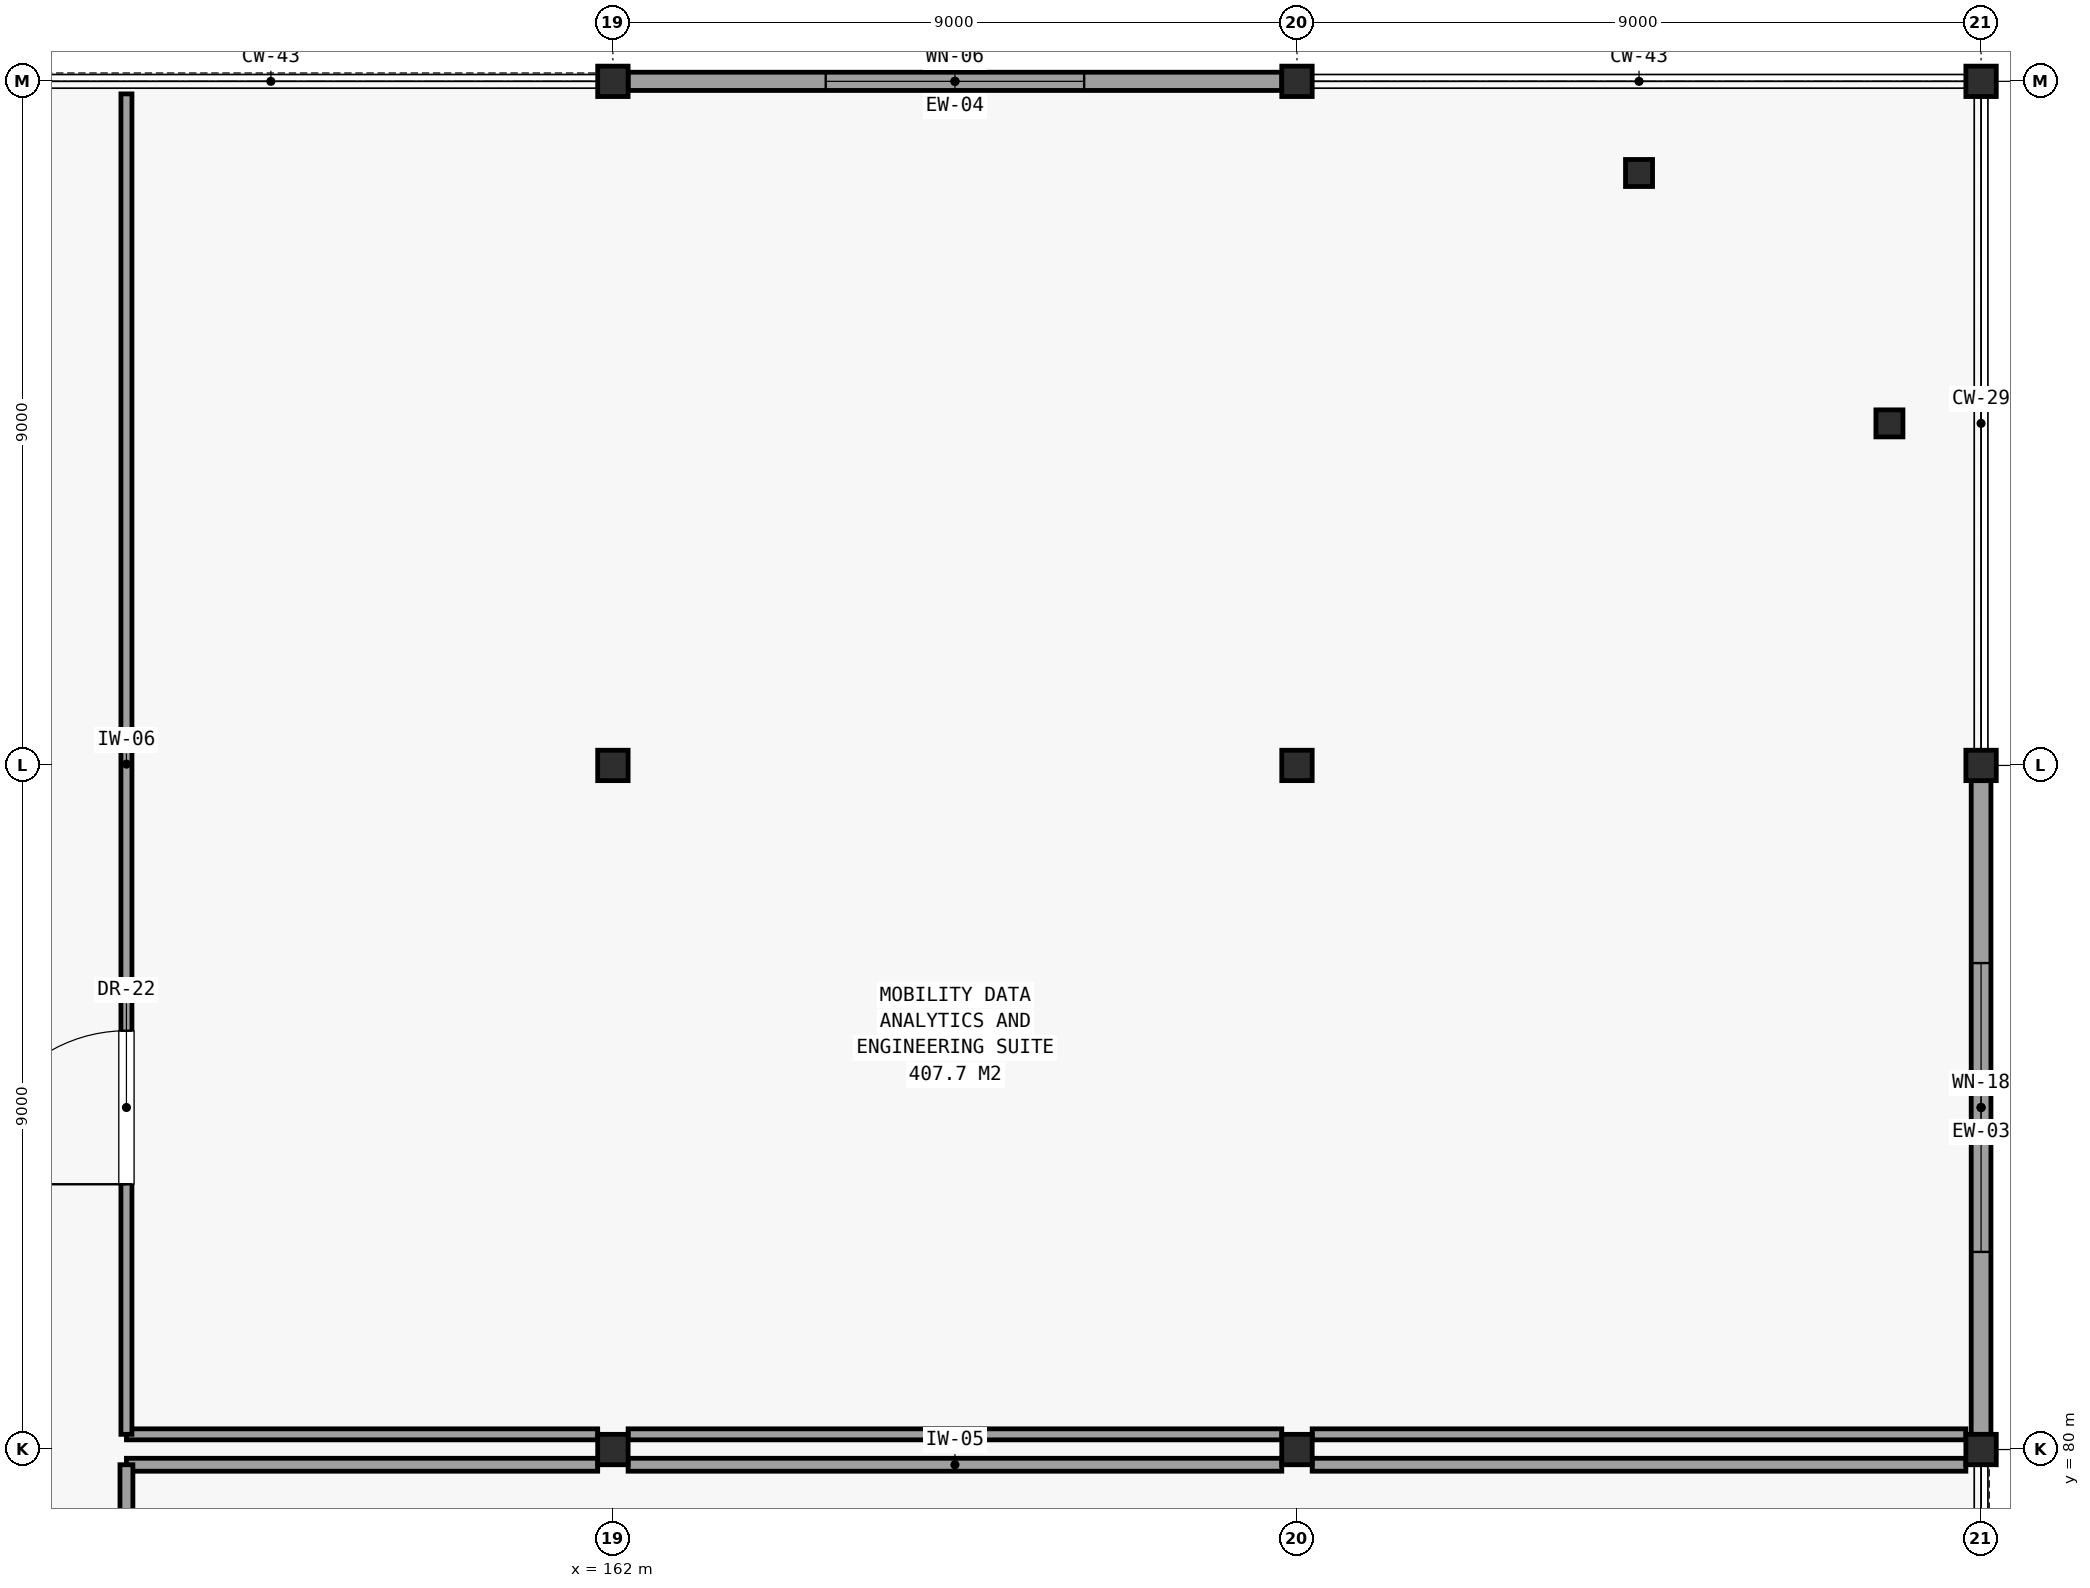
"""IFC4 building model, lengths in metres.
Left out: names, types, materials, properties, quantities, classifications, styles, units other than length and angle.
Written with IfcOpenShell. Run it as: python <this file> out.ifc"""

import sys

from ifc_helpers import new_model, si_unit, direction, frame, frame_2d, origin, origin_2d, place, context, subcontext, project, spatial, rectangle, hollow_rectangle, hollow_circle, extrude, element, fill, save


model = new_model("IFC4")
c1 = context("Model", 3, precision=1e-05, world=origin(), true_north=direction((0.0, 1.0)))
c2 = subcontext(c1, "Body", "Model", "MODEL_VIEW")
j1 = project(units=[si_unit("LENGTHUNIT", "METRE"), si_unit("PLANEANGLEUNIT", "RADIAN")], contexts=[c1])
p1 = place(None, origin())
s1 = spatial("IfcSite", under=j1, at=p1, CompositionType="ELEMENT")
p2 = place(p1, origin())
s2 = spatial("IfcBuilding", under=s1, at=p2, CompositionType="ELEMENT")
p3 = place(p2, frame((0.0, 0.0, 13.5)))
s3 = spatial("IfcBuildingStorey", under=s2, at=p3, CompositionType="ELEMENT", Elevation=13.5)
for number, where, z_axis, x_axis in (
    (1, (162.0, 80.0, 0.0), (0.0, 0.0, 1.0), (1.0, 0.0, 0.0)),
    (2, (162.0, 89.0, 0.0), (0.0, 0.0, 1.0), (1.0, 0.0, 0.0)),
    (3, (162.0, 98.0, 0.0), (0.0, 0.0, 1.0), (1.0, 0.0, 0.0)),
    (4, (171.0, 80.0, 0.0), (0.0, 0.0, 1.0), (1.0, 0.0, 0.0)),
    (5, (171.0, 89.0, 0.0), (0.0, 0.0, 1.0), (1.0, 0.0, 0.0)),
    (6, (171.0, 98.0, 0.0), (0.0, 0.0, 1.0), (1.0, 0.0, 0.0)),
):
    element("IfcColumn", number, at=place(p3, frame(where, z_axis=z_axis, x_axis=x_axis)), inside=s3, PredefinedType="COLUMN", context=c2, shape_type="SweptSolid", body=[
        extrude(hollow_rectangle(XDim=0.4, YDim=0.4, WallThickness=0.019, at=origin_2d()), origin(), (0.0, 0.0, 1.0), 4.2),
    ])
for number, where, z_axis, x_axis in (
    (7, (175.5, 96.794, 0.0), (0.0, 0.0, 1.0), (1.0, 0.0, 0.0)),
    (8, (178.794, 93.5, 0.0), (0.0, 0.0, 1.0), (1.0, 0.0, 0.0)),
):
    element("IfcColumn", number, at=place(p3, frame(where, z_axis=z_axis, x_axis=x_axis)), inside=s3, PredefinedType="COLUMN", context=c2, shape_type="SweptSolid", body=[
        extrude(hollow_circle(Radius=0.178, WallThickness=0.013, at=origin_2d()), origin(), (0.0, 0.0, 1.0), 4.2),
    ])
for number, where, z_axis, x_axis in (
    (9, (180.0, 80.0, 0.0), (0.0, 0.0, 1.0), (1.0, 0.0, 0.0)),
    (10, (180.0, 89.0, 0.0), (0.0, 0.0, 1.0), (1.0, 0.0, 0.0)),
    (11, (180.0, 98.0, 0.0), (0.0, 0.0, 1.0), (1.0, 0.0, 0.0)),
):
    element("IfcColumn", number, at=place(p3, frame(where, z_axis=z_axis, x_axis=x_axis)), inside=s3, PredefinedType="COLUMN", context=c2, shape_type="SweptSolid", body=[
        extrude(hollow_rectangle(XDim=0.4, YDim=0.4, WallThickness=0.019, at=origin_2d()), origin(), (0.0, 0.0, 1.0), 4.2),
    ])
p4 = place(p3, frame((180.0, 80.2, 0.0), z_axis=(0.0, 0.0, 1.0), x_axis=(0.0, 1.0, 0.0)))
e12 = element("IfcWall", 12, at=p4, inside=s3, PredefinedType="SOLIDWALL", context=c2, shape_type="SweptSolid", body=[
    extrude(rectangle(XDim=8.6, YDim=0.26, at=frame_2d((4.3, 0.0))), origin(), (0.0, 0.0, 1.0), 3.362),
])
p5 = place(p4, frame((2.4, 0.0, 0.95)))
e13 = element("IfcOpeningElement", 13, at=p5, cuts=e12, PredefinedType="OPENING", context=c2, shape_type="SweptSolid", body=[
    extrude(rectangle(XDim=3.8, YDim=2.1, at=frame_2d((1.9, 1.05))), frame((0.0, 0.141, 0.0), z_axis=(0.0, -1.0, 0.0), x_axis=(1.0, 0.0, 0.0)), (0.0, 0.0, 1.0), 0.282),
])
p6 = place(p3, frame((170.8, 98.0, 0.0), z_axis=(0.0, 0.0, 1.0), x_axis=(-1.0, 0.0, 0.0)))
e14 = element("IfcWall", 14, at=p6, inside=s3, PredefinedType="SOLIDWALL", context=c2, shape_type="SweptSolid", body=[
    extrude(rectangle(XDim=8.6, YDim=0.24, at=frame_2d((4.3, 0.0))), origin(), (0.0, 0.0, 1.0), 3.3),
])
p7 = place(p6, frame((2.6, 0.0, 0.95)))
e15 = element("IfcOpeningElement", 15, at=p7, cuts=e14, PredefinedType="OPENING", context=c2, shape_type="SweptSolid", body=[
    extrude(rectangle(XDim=3.4, YDim=2.0, at=frame_2d((1.7, 1.0))), frame((0.0, 0.131, 0.0), z_axis=(0.0, -1.0, 0.0), x_axis=(1.0, 0.0, 0.0)), (0.0, 0.0, 1.0), 0.262),
])
p8 = place(p3, frame((155.6, 79.8, 0.0), z_axis=(0.0, 0.0, 1.0), x_axis=(1.0, 0.0, 0.0)))
e16 = element("IfcWall", 16, at=p8, inside=s3, PredefinedType="PARTITIONING", context=c2, shape_type="SweptSolid", body=[
    extrude(rectangle(XDim=6.2, YDim=0.17, at=frame_2d((3.1, 0.0))), origin(), (0.0, 0.0, 1.0), 3.3),
])
for number, where, z_axis, x_axis in (
    (17, (162.2, 79.8, 0.0), (0.0, 0.0, 1.0), (1.0, 0.0, 0.0)),
    (18, (171.2, 79.8, 0.0), (0.0, 0.0, 1.0), (1.0, 0.0, 0.0)),
):
    element("IfcWall", number, at=place(p3, frame(where, z_axis=z_axis, x_axis=x_axis)), inside=s3, PredefinedType="PARTITIONING", context=c2, shape_type="SweptSolid", body=[
        extrude(rectangle(XDim=8.6, YDim=0.17, at=frame_2d((4.3, 0.0))), origin(), (0.0, 0.0, 1.0), 3.3),
    ])
p9 = place(p3, frame((155.6, 62.2, 0.0), z_axis=(0.0, 0.0, 1.0), x_axis=(0.0, 1.0, 0.0)))
e19 = element("IfcWall", 19, at=p9, inside=s3, PredefinedType="PARTITIONING", context=c2, shape_type="SweptSolid", body=[
    extrude(rectangle(XDim=17.6, YDim=0.17, at=frame_2d((8.8, 0.0))), origin(), (0.0, 0.0, 1.0), 3.362),
])
p10 = place(p9, frame((12.34, 0.0, 0.0)))
e20 = element("IfcOpeningElement", 20, at=p10, cuts=e19, PredefinedType="OPENING", context=c2, shape_type="SweptSolid", body=[
    extrude(rectangle(XDim=1.92, YDim=2.45, at=frame_2d((0.96, 1.225))), frame((0.0, 0.096, 0.0), z_axis=(0.0, -1.0, 0.0), x_axis=(1.0, 0.0, 0.0)), (0.0, 0.0, 1.0), 0.192),
])
p11 = place(p3, frame((155.6, 80.2, 0.0), z_axis=(0.0, 0.0, 1.0), x_axis=(1.0, 0.0, 0.0)))
e21 = element("IfcWall", 21, at=p11, inside=s3, PredefinedType="PARTITIONING", context=c2, shape_type="SweptSolid", body=[
    extrude(rectangle(XDim=6.2, YDim=0.145, at=frame_2d((3.1, 0.0))), origin(), (0.0, 0.0, 1.0), 3.3),
])
for number, where, z_axis, x_axis in (
    (22, (162.2, 80.2, 0.0), (0.0, 0.0, 1.0), (1.0, 0.0, 0.0)),
    (23, (171.2, 80.2, 0.0), (0.0, 0.0, 1.0), (1.0, 0.0, 0.0)),
):
    element("IfcWall", number, at=place(p3, frame(where, z_axis=z_axis, x_axis=x_axis)), inside=s3, PredefinedType="PARTITIONING", context=c2, shape_type="SweptSolid", body=[
        extrude(rectangle(XDim=8.6, YDim=0.145, at=frame_2d((4.3, 0.0))), origin(), (0.0, 0.0, 1.0), 3.3),
    ])
p12 = place(p3, frame((155.6, 80.2, 0.0), z_axis=(0.0, 0.0, 1.0), x_axis=(0.0, 1.0, 0.0)))
e24 = element("IfcWall", 24, at=p12, inside=s3, PredefinedType="PARTITIONING", context=c2, shape_type="SweptSolid", body=[
    extrude(rectangle(XDim=17.635, YDim=0.145, at=frame_2d((8.817, 0.0))), origin(), (0.0, 0.0, 1.0), 3.362),
])
p13 = place(p12, frame((3.29, 0.0, 0.0)))
e25 = element("IfcOpeningElement", 25, at=p13, cuts=e24, PredefinedType="OPENING", context=c2, shape_type="SweptSolid", body=[
    extrude(rectangle(XDim=2.02, YDim=2.5, at=frame_2d((1.01, 1.25))), frame((0.0, 0.083, 0.0), z_axis=(0.0, -1.0, 0.0), x_axis=(1.0, 0.0, 0.0)), (0.0, 0.0, 1.0), 0.167),
])
p14 = place(p5, origin())
e26 = element("IfcWindow", 26, at=p14, inside=s3, PartitioningType="SINGLE_PANEL", PredefinedType="WINDOW", context=c2, shape_type="SweptSolid", body=[
    extrude(rectangle(XDim=3.8, YDim=2.1, at=frame_2d((1.9, 1.05))), frame((0.0, 0.03, 0.0), z_axis=(0.0, -1.0, 0.0), x_axis=(1.0, 0.0, 0.0)), (0.0, 0.0, 1.0), 0.06),
])
fill(e13, e26)
p15 = place(p7, origin())
e27 = element("IfcWindow", 27, at=p15, inside=s3, PartitioningType="SINGLE_PANEL", PredefinedType="WINDOW", context=c2, shape_type="SweptSolid", body=[
    extrude(rectangle(XDim=3.4, YDim=2.0, at=frame_2d((1.7, 1.0))), frame((0.0, 0.03, 0.0), z_axis=(0.0, -1.0, 0.0), x_axis=(1.0, 0.0, 0.0)), (0.0, 0.0, 1.0), 0.06),
])
fill(e15, e27)
p16 = place(p13, origin())
e28 = element("IfcDoor", 28, at=p16, inside=s3, OperationType="SINGLE_SWING_LEFT", PredefinedType="DOOR", context=c2, shape_type="SweptSolid", body=[
    extrude(rectangle(XDim=2.02, YDim=2.5, at=frame_2d((1.01, 1.25))), frame((0.0, 0.025, 0.0), z_axis=(0.0, -1.0, 0.0), x_axis=(1.0, 0.0, 0.0)), (0.0, 0.0, 1.0), 0.05),
])
fill(e25, e28)
save(model, sys.argv[1])
